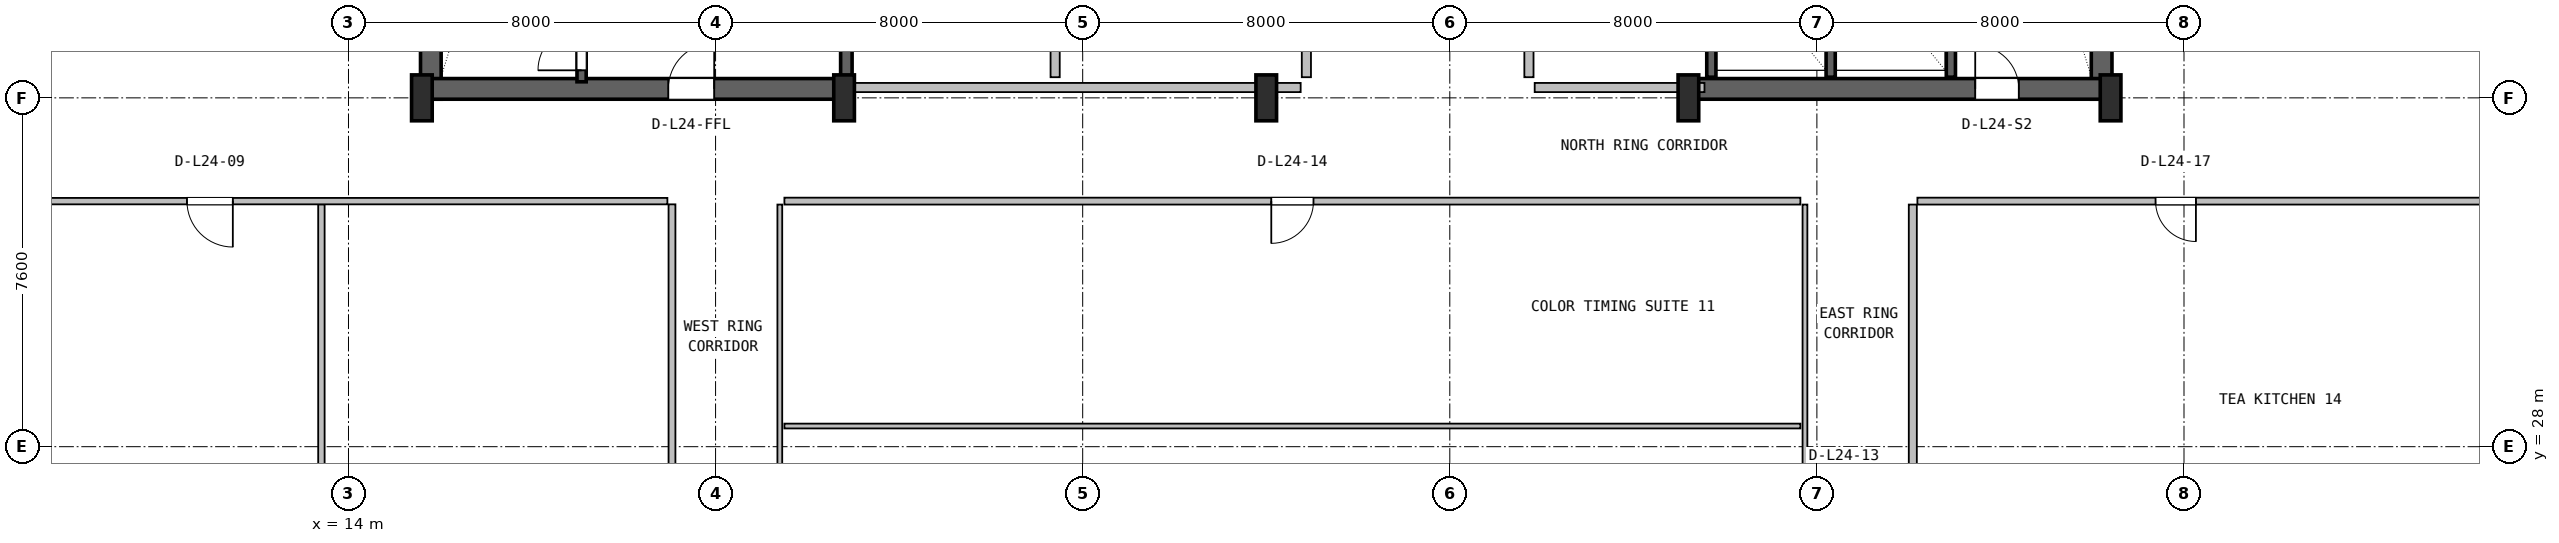
"""IFC4 building model, lengths in metres.
Left out: names, types, materials, properties, quantities, classifications, styles, units other than length and angle.
Written with IfcOpenShell. Run it as: python <this file> out.ifc"""

import sys

from ifc_helpers import new_model, si_unit, direction, frame, frame_2d, origin, origin_2d, place, context, subcontext, project, spatial, rectangle, i_section, extrude, source, transform, mapped, element, fill, save


model = new_model("IFC4")
c1 = context("Model", 3, precision=1e-05, world=origin(), true_north=direction((0.0, 1.0)))
c2 = subcontext(c1, "Body", "Model", "MODEL_VIEW")
j1 = project(units=[si_unit("LENGTHUNIT", "METRE"), si_unit("PLANEANGLEUNIT", "RADIAN")], contexts=[c1])
p1 = place(None, origin())
s1 = spatial("IfcSite", under=j1, at=p1, CompositionType="ELEMENT")
p2 = place(p1, origin())
s2 = spatial("IfcBuilding", under=s1, at=p2, CompositionType="ELEMENT")
p3 = place(p2, frame((0.0, 0.0, 103.0)))
s3 = spatial("IfcBuildingStorey", under=s2, at=p3, CompositionType="ELEMENT", Elevation=103.0)
for number, where, z_axis, x_axis in (
    (1, (15.795, 35.57, 0.0), (0.0, 0.0, 1.0), (0.0, 1.0, 0.0)),
    (2, (52.205, 35.57, 0.0), (0.0, 0.0, 1.0), (0.0, 1.0, 0.0)),
):
    element("IfcWall", number, at=place(p3, frame(where, z_axis=z_axis, x_axis=x_axis)), inside=s3, PredefinedType="SHEAR", context=c2, shape_type="SweptSolid", body=[
        extrude(rectangle(XDim=11.23, YDim=0.45, at=frame_2d((5.615, 0.0))), origin(), (0.0, 0.0, 1.0), 3.55),
    ])
p4 = place(p3, frame((15.57, 35.795, 0.0), z_axis=(0.0, 0.0, 1.0), x_axis=(1.0, 0.0, 0.0)))
e3 = element("IfcWall", 3, at=p4, inside=s3, PredefinedType="SHEAR", context=c2, shape_type="SweptSolid", body=[
    extrude(rectangle(XDim=9.23, YDim=0.45, at=frame_2d((4.615, 0.0))), origin(), (0.0, 0.0, 1.0), 3.55),
])
p5 = place(p4, frame((5.4, 0.0, 0.0)))
e4 = element("IfcOpeningElement", 4, at=p5, cuts=e3, PredefinedType="OPENING", context=c2, shape_type="SweptSolid", body=[
    extrude(rectangle(XDim=1.0, YDim=2.1, at=frame_2d((0.5, 1.05))), frame((0.0, 0.235, 0.0), z_axis=(0.0, -1.0, 0.0), x_axis=(1.0, 0.0, 0.0)), (0.0, 0.0, 1.0), 0.47),
])
p6 = place(p3, frame((43.2, 35.795, 0.0), z_axis=(0.0, 0.0, 1.0), x_axis=(1.0, 0.0, 0.0)))
e5 = element("IfcWall", 5, at=p6, inside=s3, PredefinedType="SHEAR", context=c2, shape_type="SweptSolid", body=[
    extrude(rectangle(XDim=9.23, YDim=0.45, at=frame_2d((4.615, 0.0))), origin(), (0.0, 0.0, 1.0), 3.55),
])
p7 = place(p6, frame((6.25, 0.0, 0.0)))
e6 = element("IfcOpeningElement", 6, at=p7, cuts=e5, PredefinedType="OPENING", context=c2, shape_type="SweptSolid", body=[
    extrude(rectangle(XDim=0.95, YDim=2.1, at=frame_2d((0.475, 1.05))), frame((0.0, 0.235, 0.0), z_axis=(0.0, -1.0, 0.0), x_axis=(1.0, 0.0, 0.0)), (0.0, 0.0, 1.0), 0.47),
])
m1 = source(origin(), c2, "Body", "SweptSolid", [
    extrude(i_section(OverallWidth=0.45, OverallDepth=1.0, WebThickness=0.016, FlangeThickness=0.03, FilletRadius=0.016, at=origin_2d()), origin(), (0.0, 0.0, 1.0), 3.8),
])
for number, where, z_axis, x_axis in (
    (7, (15.6, 35.6, 0.0), (0.0, 0.0, 1.0), (1.0, 0.0, 0.0)),
    (8, (24.8, 35.6, 0.0), (0.0, 0.0, 1.0), (1.0, 0.0, 0.0)),
    (9, (34.0, 35.6, 0.0), (0.0, 0.0, 1.0), (1.0, 0.0, 0.0)),
    (10, (43.2, 35.6, 0.0), (0.0, 0.0, 1.0), (1.0, 0.0, 0.0)),
    (11, (52.4, 35.6, 0.0), (0.0, 0.0, 1.0), (1.0, 0.0, 0.0)),
):
    element("IfcColumn", number, at=place(p3, frame(where, z_axis=z_axis, x_axis=x_axis)), inside=s3, PredefinedType="COLUMN", context=c2, shape_type="MappedRepresentation", body=[
        mapped(m1, transform((0.0, 0.0, 0.0), x_axis=(1.0, 0.0, 0.0), y_axis=(0.0, 1.0, 0.0), z_axis=(0.0, 0.0, 1.0), scale=1.0)),
    ])
p8 = place(p3, frame((19.08, 35.95, 0.0), z_axis=(0.0, 0.0, 1.0), x_axis=(0.0, 1.0, 0.0)))
e12 = element("IfcWall", 12, at=p8, inside=s3, PredefinedType="SHEAR", context=c2, shape_type="SweptSolid", body=[
    extrude(rectangle(XDim=9.65, YDim=0.2, at=frame_2d((4.825, 0.0))), origin(), (0.0, 0.0, 1.0), 3.55),
])
p9 = place(p8, frame((0.25, 0.0, 0.0)))
e13 = element("IfcOpeningElement", 13, at=p9, cuts=e12, PredefinedType="OPENING", context=c2, shape_type="SweptSolid", body=[
    extrude(rectangle(XDim=0.95, YDim=2.1, at=frame_2d((0.475, 1.05))), frame((0.0, 0.11, 0.0), z_axis=(0.0, -1.0, 0.0), x_axis=(1.0, 0.0, 0.0)), (0.0, 0.0, 1.0), 0.22),
])
p10 = place(p3, frame((24.85, 36.05, 0.0), z_axis=(0.0, 0.0, 1.0), x_axis=(0.0, 1.0, 0.0)))
e14 = element("IfcWall", 14, at=p10, inside=s3, PredefinedType="SHEAR", context=c2, shape_type="SweptSolid", body=[
    extrude(rectangle(XDim=10.45, YDim=0.25, at=frame_2d((5.225, 0.0))), origin(), (0.0, 0.0, 1.0), 3.55),
])
p11 = place(p3, frame((48.92, 36.05, 0.0), z_axis=(0.0, 0.0, 1.0), x_axis=(0.0, 1.0, 0.0)))
e15 = element("IfcWall", 15, at=p11, inside=s3, PredefinedType="SHEAR", context=c2, shape_type="SweptSolid", body=[
    extrude(rectangle(XDim=10.5, YDim=0.2, at=frame_2d((5.25, 0.0))), origin(), (0.0, 0.0, 1.0), 3.55),
])
for number, where, z_axis, x_axis in (
    (16, (43.7, 36.05, 0.0), (0.0, 0.0, 1.0), (0.0, 1.0, 0.0)),
    (17, (46.3, 36.05, 0.0), (0.0, 0.0, 1.0), (0.0, 1.0, 0.0)),
):
    element("IfcWall", number, at=place(p3, frame(where, z_axis=z_axis, x_axis=x_axis)), inside=s3, PredefinedType="SHEAR", context=c2, shape_type="SweptSolid", body=[
        extrude(rectangle(XDim=3.05, YDim=0.2, at=frame_2d((1.525, 0.0))), origin(), (0.0, 0.0, 1.0), 3.55),
    ])
p12 = place(p3, frame((25.0, 35.825, 0.0), z_axis=(0.0, 0.0, 1.0), x_axis=(1.0, 0.0, 0.0)))
e18 = element("IfcWall", 18, at=p12, inside=s3, PredefinedType="PLUMBINGWALL", context=c2, shape_type="SweptSolid", body=[
    extrude(rectangle(XDim=9.75, YDim=0.2, at=frame_2d((4.875, 0.0))), origin(), (0.0, 0.0, 1.0), 2.325),
])
for number, where, z_axis, x_axis in (
    (19, (29.4, 36.05, 0.0), (0.0, 0.0, 1.0), (0.0, 1.0, 0.0)),
    (20, (34.875, 36.05, 0.0), (0.0, 0.0, 1.0), (0.0, 1.0, 0.0)),
):
    element("IfcWall", number, at=place(p3, frame(where, z_axis=z_axis, x_axis=x_axis)), inside=s3, PredefinedType="PLUMBINGWALL", context=c2, shape_type="SweptSolid", body=[
        extrude(rectangle(XDim=3.1, YDim=0.2, at=frame_2d((1.55, 0.0))), origin(), (0.0, 0.0, 1.0), 3.53),
    ])
p13 = place(p3, frame((39.85, 35.825, 0.0), z_axis=(0.0, 0.0, 1.0), x_axis=(1.0, 0.0, 0.0)))
e21 = element("IfcWall", 21, at=p13, inside=s3, PredefinedType="SOLIDWALL", context=c2, shape_type="SweptSolid", body=[
    extrude(rectangle(XDim=3.7, YDim=0.2, at=frame_2d((1.85, 0.0))), origin(), (0.0, 0.0, 1.0), 2.325),
])
p14 = place(p3, frame((39.725, 36.05, 0.0), z_axis=(0.0, 0.0, 1.0), x_axis=(0.0, 1.0, 0.0)))
e22 = element("IfcWall", 22, at=p14, inside=s3, PredefinedType="SOLIDWALL", context=c2, shape_type="SweptSolid", body=[
    extrude(rectangle(XDim=3.1, YDim=0.2, at=frame_2d((1.55, 0.0))), origin(), (0.0, 0.0, 1.0), 3.53),
])
p15 = place(p3, frame((13.41, 15.293, 0.0), z_axis=(0.0, 0.0, 1.0), x_axis=(0.0, 1.0, 0.0)))
e23 = element("IfcWall", 23, at=p15, inside=s3, PredefinedType="PARTITIONING", context=c2, shape_type="SweptSolid", body=[
    extrude(rectangle(XDim=17.987, YDim=0.14, at=frame_2d((8.994, 0.0))), origin(), (0.0, 0.0, 1.0), 3.222),
])
p16 = place(p3, frame((4.68, 33.35, 0.0), z_axis=(0.0, 0.0, 1.0), x_axis=(1.0, 0.0, 0.0)))
e24 = element("IfcWall", 24, at=p16, inside=s3, PredefinedType="PARTITIONING", context=c2, shape_type="SweptSolid", body=[
    extrude(rectangle(XDim=16.27, YDim=0.14, at=frame_2d((8.135, 0.0))), origin(), (0.0, 0.0, 1.0), 3.108),
])
p17 = place(p16, frame((5.8, 0.0, 0.0)))
e25 = element("IfcOpeningElement", 25, at=p17, cuts=e24, PredefinedType="OPENING", context=c2, shape_type="SweptSolid", body=[
    extrude(rectangle(XDim=1.0, YDim=2.1, at=frame_2d((0.5, 1.05))), frame((0.0, 0.08, 0.0), z_axis=(0.0, -1.0, 0.0), x_axis=(1.0, 0.0, 0.0)), (0.0, 0.0, 1.0), 0.16),
])
p18 = place(p3, frame((21.05, 15.293, 0.0), z_axis=(0.0, 0.0, 1.0), x_axis=(0.0, 1.0, 0.0)))
e26 = element("IfcWall", 26, at=p18, inside=s3, PredefinedType="PARTITIONING", context=c2, shape_type="SweptSolid", body=[
    extrude(rectangle(XDim=17.987, YDim=0.15, at=frame_2d((8.994, 0.0))), origin(), (0.0, 0.0, 1.0), 3.222),
])
p19 = place(p18, frame((8.562, 0.0, 0.0)))
e27 = element("IfcOpeningElement", 27, at=p19, cuts=e26, PredefinedType="OPENING", context=c2, shape_type="SweptSolid", body=[
    extrude(rectangle(XDim=0.88, YDim=2.06, at=frame_2d((0.44, 1.03))), frame((0.0, 0.085, 0.0), z_axis=(0.0, -1.0, 0.0), x_axis=(1.0, 0.0, 0.0)), (0.0, 0.0, 1.0), 0.17),
])
p20 = place(p3, frame((45.74, 17.642, 0.0), z_axis=(0.0, 0.0, 1.0), x_axis=(0.0, 1.0, 0.0)))
e28 = element("IfcWall", 28, at=p20, inside=s3, PredefinedType="PARTITIONING", context=c2, shape_type="SweptSolid", body=[
    extrude(rectangle(XDim=15.633, YDim=0.105, at=frame_2d((7.816, 0.0))), origin(), (0.0, 0.0, 1.0), 3.222),
])
p21 = place(p20, frame((5.573, 0.0, 0.0)))
e29 = element("IfcOpeningElement", 29, at=p21, cuts=e28, PredefinedType="OPENING", context=c2, shape_type="SweptSolid", body=[
    extrude(rectangle(XDim=0.88, YDim=2.06, at=frame_2d((0.44, 1.03))), frame((0.0, 0.062, 0.0), z_axis=(0.0, -1.0, 0.0), x_axis=(1.0, 0.0, 0.0)), (0.0, 0.0, 1.0), 0.125),
])
p22 = place(p20, frame((8.658, 0.0, 0.0)))
e30 = element("IfcOpeningElement", 30, at=p22, cuts=e28, PredefinedType="OPENING", context=c2, shape_type="SweptSolid", body=[
    extrude(rectangle(XDim=0.88, YDim=2.06, at=frame_2d((0.44, 1.03))), frame((0.0, 0.062, 0.0), z_axis=(0.0, -1.0, 0.0), x_axis=(1.0, 0.0, 0.0)), (0.0, 0.0, 1.0), 0.125),
])
p23 = place(p3, frame((23.4, 17.642, 0.0), z_axis=(0.0, 0.0, 1.0), x_axis=(0.0, 1.0, 0.0)))
e31 = element("IfcWall", 31, at=p23, inside=s3, PredefinedType="PARTITIONING", context=c2, shape_type="SweptSolid", body=[
    extrude(rectangle(XDim=15.633, YDim=0.105, at=frame_2d((7.816, 0.0))), origin(), (0.0, 0.0, 1.0), 3.222),
])
p24 = place(p3, frame((23.5, 28.45, 0.0), z_axis=(0.0, 0.0, 1.0), x_axis=(1.0, 0.0, 0.0)))
e32 = element("IfcWall", 32, at=p24, inside=s3, PredefinedType="PARTITIONING", context=c2, shape_type="SweptSolid", body=[
    extrude(rectangle(XDim=22.14, YDim=0.105, at=frame_2d((11.07, 0.0))), origin(), (0.0, 0.0, 1.0), 2.83),
])
p25 = place(p3, frame((23.5, 33.35, 0.0), z_axis=(0.0, 0.0, 1.0), x_axis=(1.0, 0.0, 0.0)))
e33 = element("IfcWall", 33, at=p25, inside=s3, PredefinedType="PARTITIONING", context=c2, shape_type="SweptSolid", body=[
    extrude(rectangle(XDim=22.14, YDim=0.15, at=frame_2d((11.07, 0.0))), origin(), (0.0, 0.0, 1.0), 2.83),
])
p26 = place(p25, frame((10.61, 0.0, 0.0)))
e34 = element("IfcOpeningElement", 34, at=p26, cuts=e33, PredefinedType="OPENING", context=c2, shape_type="SweptSolid", body=[
    extrude(rectangle(XDim=0.92, YDim=2.08, at=frame_2d((0.46, 1.04))), frame((0.0, 0.085, 0.0), z_axis=(0.0, -1.0, 0.0), x_axis=(1.0, 0.0, 0.0)), (0.0, 0.0, 1.0), 0.17),
])
p27 = place(p3, frame((48.09, 15.293, 0.0), z_axis=(0.0, 0.0, 1.0), x_axis=(0.0, 1.0, 0.0)))
e35 = element("IfcWall", 35, at=p27, inside=s3, PredefinedType="PARTITIONING", context=c2, shape_type="SweptSolid", body=[
    extrude(rectangle(XDim=17.982, YDim=0.175, at=frame_2d((8.991, 0.0))), origin(), (0.0, 0.0, 1.0), 3.222),
])
p28 = place(p27, frame((1.572, 0.0, 0.0)))
e36 = element("IfcOpeningElement", 36, at=p28, cuts=e35, PredefinedType="OPENING", context=c2, shape_type="SweptSolid", body=[
    extrude(rectangle(XDim=1.05, YDim=2.1, at=frame_2d((0.525, 1.05))), frame((0.0, 0.098, 0.0), z_axis=(0.0, -1.0, 0.0), x_axis=(1.0, 0.0, 0.0)), (0.0, 0.0, 1.0), 0.195),
])
p29 = place(p27, frame((6.732, 0.0, 0.0)))
e37 = element("IfcOpeningElement", 37, at=p29, cuts=e35, PredefinedType="OPENING", context=c2, shape_type="SweptSolid", body=[
    extrude(rectangle(XDim=1.0, YDim=2.1, at=frame_2d((0.5, 1.05))), frame((0.0, 0.098, 0.0), z_axis=(0.0, -1.0, 0.0), x_axis=(1.0, 0.0, 0.0)), (0.0, 0.0, 1.0), 0.195),
])
p30 = place(p3, frame((48.19, 33.35, 0.0), z_axis=(0.0, 0.0, 1.0), x_axis=(1.0, 0.0, 0.0)))
e38 = element("IfcWall", 38, at=p30, inside=s3, PredefinedType="PARTITIONING", context=c2, shape_type="SweptSolid", body=[
    extrude(rectangle(XDim=15.13, YDim=0.15, at=frame_2d((7.565, 0.0))), origin(), (0.0, 0.0, 1.0), 3.108),
])
p31 = place(p30, frame((5.19, 0.0, 0.0)))
e39 = element("IfcOpeningElement", 39, at=p31, cuts=e38, PredefinedType="OPENING", context=c2, shape_type="SweptSolid", body=[
    extrude(rectangle(XDim=0.88, YDim=2.06, at=frame_2d((0.44, 1.03))), frame((0.0, 0.085, 0.0), z_axis=(0.0, -1.0, 0.0), x_axis=(1.0, 0.0, 0.0)), (0.0, 0.0, 1.0), 0.17),
])
m2 = source(origin(), c2, "Body", "SweptSolid", [
    extrude(rectangle(XDim=0.95, YDim=2.1, at=frame_2d((0.475, 1.05))), frame((0.0, 0.025, 0.0), z_axis=(0.0, -1.0, 0.0), x_axis=(1.0, 0.0, 0.0)), (0.0, 0.0, 1.0), 0.05),
])
p32 = place(p9, origin())
e40 = element("IfcDoor", 40, at=p32, inside=s3, OperationType="SINGLE_SWING_LEFT", PredefinedType="DOOR", context=c2, shape_type="MappedRepresentation", body=[
    mapped(m2, transform((0.0, 0.0, 0.0), x_axis=(1.0, 0.0, 0.0), y_axis=(0.0, 1.0, 0.0), z_axis=(0.0, 0.0, 1.0), scale=1.0)),
])
fill(e13, e40)
m3 = source(origin(), c2, "Body", "SweptSolid", [
    extrude(rectangle(XDim=1.0, YDim=2.1, at=frame_2d((0.5, 1.05))), frame((0.0, 0.025, 0.0), z_axis=(0.0, -1.0, 0.0), x_axis=(1.0, 0.0, 0.0)), (0.0, 0.0, 1.0), 0.05),
])
p33 = place(p5, origin())
e41 = element("IfcDoor", 41, at=p33, inside=s3, OperationType="SINGLE_SWING_RIGHT", PredefinedType="DOOR", context=c2, shape_type="MappedRepresentation", body=[
    mapped(m3, transform((0.0, 0.0, 0.0), x_axis=(1.0, 0.0, 0.0), y_axis=(0.0, 1.0, 0.0), z_axis=(0.0, 0.0, 1.0), scale=1.0)),
])
fill(e4, e41)
p34 = place(p7, origin())
e42 = element("IfcDoor", 42, at=p34, inside=s3, OperationType="SINGLE_SWING_LEFT", PredefinedType="DOOR", context=c2, shape_type="MappedRepresentation", body=[
    mapped(m2, transform((0.0, 0.0, 0.0), x_axis=(1.0, 0.0, 0.0), y_axis=(0.0, 1.0, 0.0), z_axis=(0.0, 0.0, 1.0), scale=1.0)),
])
fill(e6, e42)
m4 = source(origin(), c2, "Body", "SweptSolid", [
    extrude(rectangle(XDim=1.0, YDim=2.1, at=frame_2d((0.5, 1.05))), frame((0.0, 0.025, 0.0), z_axis=(0.0, -1.0, 0.0), x_axis=(1.0, 0.0, 0.0)), (0.0, 0.0, 1.0), 0.05),
])
p35 = place(p17, frame((1.0, 0.0, 0.0), z_axis=(0.0, 0.0, 1.0), x_axis=(-1.0, 0.0, 0.0)))
e43 = element("IfcDoor", 43, at=p35, inside=s3, OperationType="SINGLE_SWING_RIGHT", PredefinedType="DOOR", context=c2, shape_type="MappedRepresentation", body=[
    mapped(m4, transform((0.0, 0.0, 0.0), x_axis=(1.0, 0.0, 0.0), y_axis=(0.0, 1.0, 0.0), z_axis=(0.0, 0.0, 1.0), scale=1.0)),
])
fill(e25, e43)
m5 = source(origin(), c2, "Body", "SweptSolid", [
    extrude(rectangle(XDim=0.92, YDim=2.08, at=frame_2d((0.46, 1.04))), frame((0.0, 0.025, 0.0), z_axis=(0.0, -1.0, 0.0), x_axis=(1.0, 0.0, 0.0)), (0.0, 0.0, 1.0), 0.05),
])
p36 = place(p26, frame((0.92, 0.0, 0.0), z_axis=(0.0, 0.0, 1.0), x_axis=(-1.0, 0.0, 0.0)))
e44 = element("IfcDoor", 44, at=p36, inside=s3, OperationType="SINGLE_SWING_LEFT", PredefinedType="DOOR", context=c2, shape_type="MappedRepresentation", body=[
    mapped(m5, transform((0.0, 0.0, 0.0), x_axis=(1.0, 0.0, 0.0), y_axis=(0.0, 1.0, 0.0), z_axis=(0.0, 0.0, 1.0), scale=1.0)),
])
fill(e34, e44)
m6 = source(origin(), c2, "Body", "SweptSolid", [
    extrude(rectangle(XDim=0.88, YDim=2.06, at=frame_2d((0.44, 1.03))), frame((0.0, 0.025, 0.0), z_axis=(0.0, -1.0, 0.0), x_axis=(1.0, 0.0, 0.0)), (0.0, 0.0, 1.0), 0.05),
])
p37 = place(p31, frame((0.88, 0.0, 0.0), z_axis=(0.0, 0.0, 1.0), x_axis=(-1.0, 0.0, 0.0)))
e45 = element("IfcDoor", 45, at=p37, inside=s3, OperationType="SINGLE_SWING_RIGHT", PredefinedType="DOOR", context=c2, shape_type="MappedRepresentation", body=[
    mapped(m6, transform((0.0, 0.0, 0.0), x_axis=(1.0, 0.0, 0.0), y_axis=(0.0, 1.0, 0.0), z_axis=(0.0, 0.0, 1.0), scale=1.0)),
])
fill(e39, e45)
save(model, sys.argv[1])
